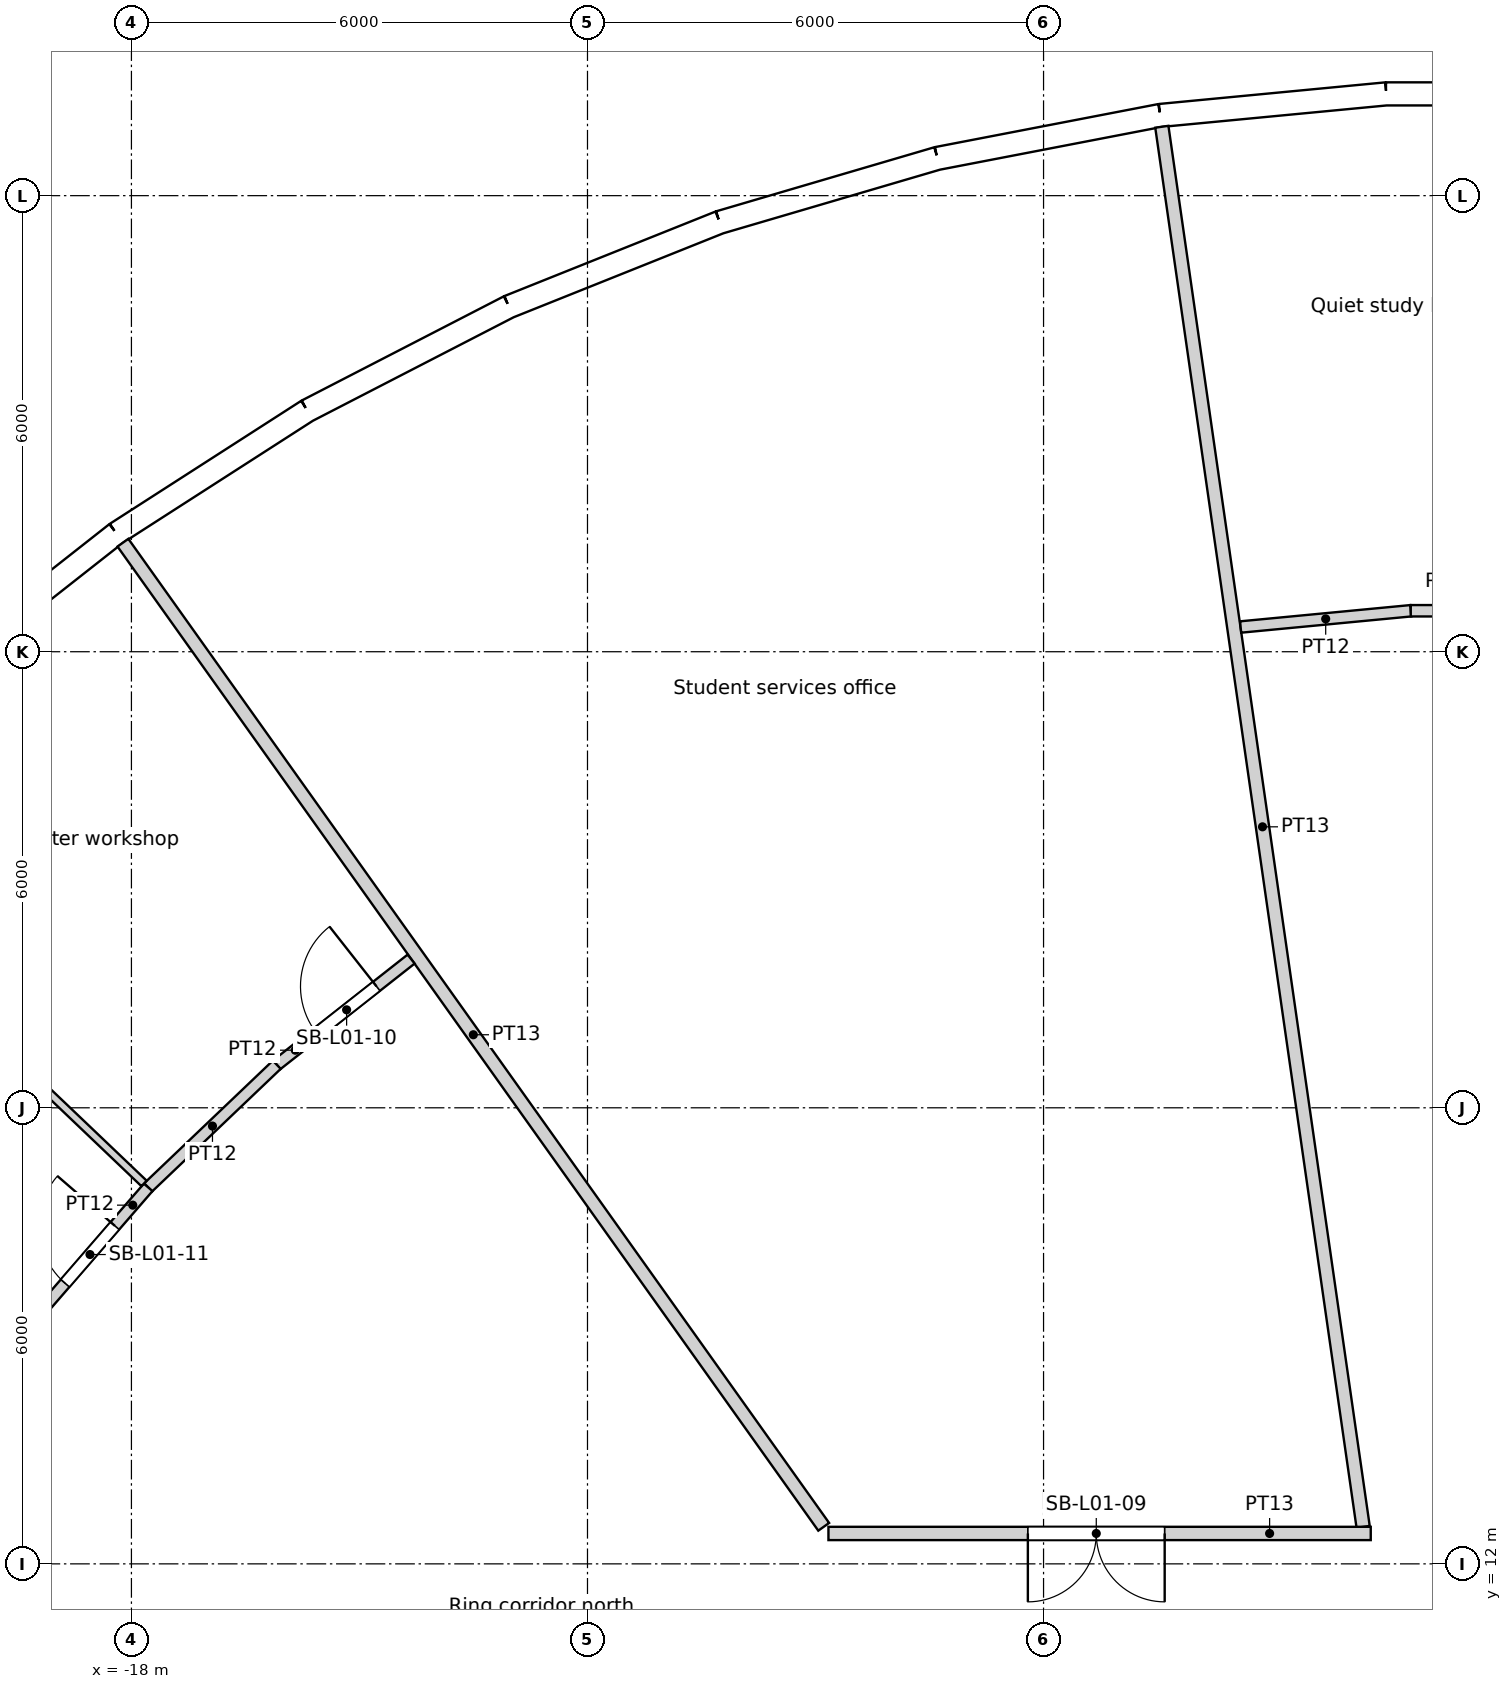
"""IFC4 building model, lengths in metres.
Left out: names, types, materials, properties, quantities, classifications, styles, units other than length and angle.
Written with IfcOpenShell. Run it as: python <this file> out.ifc"""

import sys

from ifc_helpers import new_model, si_unit, direction, frame, frame_2d, origin, origin_2d, place, context, subcontext, project, spatial, rectangle, circle, extrude, element, fill, save


model = new_model("IFC4")
c1 = context("Model", 3, precision=1e-05, world=origin(), true_north=direction((0.0, 1.0)))
c2 = subcontext(c1, "Body", "Model", "MODEL_VIEW")
j1 = project(units=[si_unit("LENGTHUNIT", "METRE"), si_unit("PLANEANGLEUNIT", "RADIAN")], contexts=[c1])
p1 = place(None, origin())
s1 = spatial("IfcSite", under=j1, at=p1, CompositionType="ELEMENT")
p2 = place(p1, origin())
s2 = spatial("IfcBuilding", under=s1, at=p2, CompositionType="ELEMENT")
p3 = place(p2, frame((0.0, 0.0, 9.0)))
s3 = spatial("IfcBuildingStorey", under=s2, at=p3, CompositionType="ELEMENT", Elevation=9.0)
for number, where, z_axis, x_axis in (
    (1, (-4.309, 29.966, 0.0), (0.0, 0.0, 1.0), (1.0, 0.0, 0.0)),
    (2, (-9.902, 28.61, 0.0), (0.0, 0.0, 1.0), (1.0, 0.0, 0.0)),
    (3, (-15.137, 26.219, 0.0), (0.0, 0.0, 1.0), (1.0, 0.0, 0.0)),
):
    element("IfcColumn", number, at=place(p3, frame(where, z_axis=z_axis, x_axis=x_axis)), inside=s3, PredefinedType="COLUMN", context=c2, shape_type="SweptSolid", body=[
        extrude(circle(Radius=0.7, at=origin_2d()), origin(), (0.0, 0.0, 1.0), 4.8),
    ])
for number, where, z_axis, x_axis in (
    (4, (-1.427, 24.506, 0.0), (0.0, 0.0, 1.0), (1.0, 0.0, 0.0)),
    (5, (-7.04, 23.516, 0.0), (0.0, 0.0, 1.0), (1.0, 0.0, 0.0)),
    (6, (-12.274, 21.259, 0.0), (0.0, 0.0, 1.0), (1.0, 0.0, 0.0)),
    (7, (-16.846, 17.855, 0.0), (0.0, 0.0, 1.0), (1.0, 0.0, 0.0)),
):
    element("IfcColumn", number, at=place(p3, frame(where, z_axis=z_axis, x_axis=x_axis)), inside=s3, PredefinedType="COLUMN", context=c2, shape_type="SweptSolid", body=[
        extrude(circle(Radius=0.75, at=origin_2d()), origin(), (0.0, 0.0, 1.0), 4.8),
    ])
for number, where, z_axis, x_axis in (
    (8, (-4.188, 18.35, 0.0), (0.0, 0.0, 1.0), (1.0, 0.0, 0.0)),
    (9, (-9.411, 16.301, 0.0), (0.0, 0.0, 1.0), (1.0, 0.0, 0.0)),
    (10, (-13.798, 12.802, 0.0), (0.0, 0.0, 1.0), (1.0, 0.0, 0.0)),
):
    element("IfcColumn", number, at=place(p3, frame(where, z_axis=z_axis, x_axis=x_axis)), inside=s3, PredefinedType="COLUMN", context=c2, shape_type="SweptSolid", body=[
        extrude(circle(Radius=0.8, at=origin_2d()), origin(), (0.0, 0.0, 1.0), 4.8),
    ])
p4 = place(p3, frame((1.493, 31.339, 0.0), z_axis=(0.0, 0.0, 1.0), x_axis=(-1.0, 0.0, 0.0)))
e11 = element("IfcWall", 11, at=p4, inside=s3, PredefinedType="SOLIDWALL", context=c2, shape_type="SweptSolid", body=[
    extrude(rectangle(XDim=2.986, YDim=0.3, at=frame_2d((1.493, 0.0))), origin(), (0.0, 0.0, 1.0), 4.35),
])
p5 = place(p4, frame((1.493, 0.0, 2.0)))
e12 = element("IfcOpeningElement", 12, at=p5, cuts=e11, PredefinedType="OPENING", context=c2, shape_type="SweptSolid", body=[
    extrude(circle(Radius=1.2, at=origin_2d()), frame((0.0, 0.16, 0.0), z_axis=(0.0, -1.0, 0.0), x_axis=(1.0, 0.0, 0.0)), (0.0, 0.0, 1.0), 0.32),
])
p6 = place(p3, frame((-1.493, 31.339, 0.0), z_axis=(0.0, 0.0, 1.0), x_axis=(-0.99547560533, -0.095017467833, 0.0)))
e13 = element("IfcWall", 13, at=p6, inside=s3, PredefinedType="SOLIDWALL", context=c2, shape_type="SweptSolid", body=[
    extrude(rectangle(XDim=2.986, YDim=0.3, at=frame_2d((1.493, 0.0))), origin(), (0.0, 0.0, 1.0), 4.35),
])
p7 = place(p6, frame((1.493, 0.0, 2.0)))
e14 = element("IfcOpeningElement", 14, at=p7, cuts=e13, PredefinedType="OPENING", context=c2, shape_type="SweptSolid", body=[
    extrude(circle(Radius=1.2, at=origin_2d()), frame((0.0, 0.16, 0.0), z_axis=(0.0, -1.0, 0.0), x_axis=(1.0, 0.0, 0.0)), (0.0, 0.0, 1.0), 0.32),
])
p8 = place(p3, frame((-4.465, 31.055, 0.0), z_axis=(0.0, 0.0, 1.0), x_axis=(-0.981918853666, -0.189302310646, 0.0)))
e15 = element("IfcWall", 15, at=p8, inside=s3, PredefinedType="SOLIDWALL", context=c2, shape_type="SweptSolid", body=[
    extrude(rectangle(XDim=2.986, YDim=0.3, at=frame_2d((1.493, 0.0))), origin(), (0.0, 0.0, 1.0), 4.35),
])
p9 = place(p8, frame((1.493, 0.0, 2.0)))
e16 = element("IfcOpeningElement", 16, at=p9, cuts=e15, PredefinedType="OPENING", context=c2, shape_type="SweptSolid", body=[
    extrude(circle(Radius=1.2, at=origin_2d()), frame((0.0, 0.16, 0.0), z_axis=(0.0, -1.0, 0.0), x_axis=(1.0, 0.0, 0.0)), (0.0, 0.0, 1.0), 0.32),
])
p10 = place(p3, frame((-7.397, 30.49, 0.0), z_axis=(0.0, 0.0, 1.0), x_axis=(-0.959502108153, -0.281701445593, 0.0)))
e17 = element("IfcWall", 17, at=p10, inside=s3, PredefinedType="SOLIDWALL", context=c2, shape_type="SweptSolid", body=[
    extrude(rectangle(XDim=2.986, YDim=0.3, at=frame_2d((1.493, 0.0))), origin(), (0.0, 0.0, 1.0), 4.35),
])
p11 = place(p10, frame((1.493, 0.0, 2.0)))
e18 = element("IfcOpeningElement", 18, at=p11, cuts=e17, PredefinedType="OPENING", context=c2, shape_type="SweptSolid", body=[
    extrude(circle(Radius=1.2, at=origin_2d()), frame((0.0, 0.16, 0.0), z_axis=(0.0, -1.0, 0.0), x_axis=(1.0, 0.0, 0.0)), (0.0, 0.0, 1.0), 0.32),
])
p12 = place(p3, frame((-10.261, 29.649, 0.0), z_axis=(0.0, 0.0, 1.0), x_axis=(-0.928380795373, -0.371630325434, 0.0)))
e19 = element("IfcWall", 19, at=p12, inside=s3, PredefinedType="SOLIDWALL", context=c2, shape_type="SweptSolid", body=[
    extrude(rectangle(XDim=2.986, YDim=0.3, at=frame_2d((1.493, 0.0))), origin(), (0.0, 0.0, 1.0), 4.35),
])
p13 = place(p12, frame((1.493, 0.0, 2.0)))
e20 = element("IfcOpeningElement", 20, at=p13, cuts=e19, PredefinedType="OPENING", context=c2, shape_type="SweptSolid", body=[
    extrude(circle(Radius=1.2, at=origin_2d()), frame((0.0, 0.16, 0.0), z_axis=(0.0, -1.0, 0.0), x_axis=(1.0, 0.0, 0.0)), (0.0, 0.0, 1.0), 0.32),
])
p14 = place(p3, frame((-13.033, 28.539, 0.0), z_axis=(0.0, 0.0, 1.0), x_axis=(-0.888831268481, -0.458234630043, 0.0)))
e21 = element("IfcWall", 21, at=p14, inside=s3, PredefinedType="SOLIDWALL", context=c2, shape_type="SweptSolid", body=[
    extrude(rectangle(XDim=2.986, YDim=0.3, at=frame_2d((1.493, 0.0))), origin(), (0.0, 0.0, 1.0), 4.35),
])
p15 = place(p14, frame((1.493, 0.0, 2.0)))
e22 = element("IfcOpeningElement", 22, at=p15, cuts=e21, PredefinedType="OPENING", context=c2, shape_type="SweptSolid", body=[
    extrude(circle(Radius=1.2, at=origin_2d()), frame((0.0, 0.16, 0.0), z_axis=(0.0, -1.0, 0.0), x_axis=(1.0, 0.0, 0.0)), (0.0, 0.0, 1.0), 0.32),
])
p16 = place(p3, frame((-15.687, 27.171, 0.0), z_axis=(0.0, 0.0, 1.0), x_axis=(-0.841242231846, -0.540658401727, 0.0)))
e23 = element("IfcWall", 23, at=p16, inside=s3, PredefinedType="SOLIDWALL", context=c2, shape_type="SweptSolid", body=[
    extrude(rectangle(XDim=2.986, YDim=0.3, at=frame_2d((1.493, 0.0))), origin(), (0.0, 0.0, 1.0), 4.35),
])
p17 = place(p16, frame((1.493, 0.0, 2.0)))
e24 = element("IfcOpeningElement", 24, at=p17, cuts=e23, PredefinedType="OPENING", context=c2, shape_type="SweptSolid", body=[
    extrude(circle(Radius=1.2, at=origin_2d()), frame((0.0, 0.16, 0.0), z_axis=(0.0, -1.0, 0.0), x_axis=(1.0, 0.0, 0.0)), (0.0, 0.0, 1.0), 0.32),
])
p18 = place(p3, frame((-18.199, 25.557, 0.0), z_axis=(0.0, 0.0, 1.0), x_axis=(-0.786043032847, -0.618171780747, 0.0)))
e25 = element("IfcWall", 25, at=p18, inside=s3, PredefinedType="SOLIDWALL", context=c2, shape_type="SweptSolid", body=[
    extrude(rectangle(XDim=2.986, YDim=0.3, at=frame_2d((1.493, 0.0))), origin(), (0.0, 0.0, 1.0), 4.35),
])
p19 = place(p18, frame((1.493, 0.0, 2.0)))
e26 = element("IfcOpeningElement", 26, at=p19, cuts=e25, PredefinedType="OPENING", context=c2, shape_type="SweptSolid", body=[
    extrude(circle(Radius=1.2, at=origin_2d()), frame((0.0, 0.16, 0.0), z_axis=(0.0, -1.0, 0.0), x_axis=(1.0, 0.0, 0.0)), (0.0, 0.0, 1.0), 0.32),
])
p20 = place(p3, frame((-22.598, 21.547, 0.0), z_axis=(0.0, 0.0, 1.0), x_axis=(0.723762960711, -0.690048677054, 0.0)))
e27 = element("IfcWall", 27, at=p20, inside=s3, PredefinedType="PARTITIONING", context=c2, shape_type="SweptSolid", body=[
    extrude(rectangle(XDim=6.583, YDim=0.1, at=frame_2d((3.291, 0.0))), origin(), (0.0, 0.0, 1.0), 3.75),
])
p21 = place(p3, frame((-18.112, 25.435, 0.0), z_axis=(0.0, 0.0, 1.0), x_axis=(0.580054828861, -0.814577433713, 0.0)))
e28 = element("IfcWall", 28, at=p21, inside=s3, PredefinedType="PARTITIONING", context=c2, shape_type="SweptSolid", body=[
    extrude(rectangle(XDim=15.894, YDim=0.175, at=frame_2d((7.947, 0.0))), origin(), (0.0, 0.0, 1.0), 3.75),
])
p22 = place(p3, frame((-19.311, 15.186, 0.0), z_axis=(0.0, 0.0, 1.0), x_axis=(0.654866925236, 0.755744209526, 0.0)))
e29 = element("IfcWall", 29, at=p22, inside=s3, PredefinedType="PARTITIONING", context=c2, shape_type="SweptSolid", body=[
    extrude(rectangle(XDim=2.338, YDim=0.15, at=frame_2d((1.169, 0.0))), origin(), (0.0, 0.0, 1.0), 3.75),
])
p23 = place(p22, frame((0.669, 0.0, 0.0)))
e30 = element("IfcOpeningElement", 30, at=p23, cuts=e29, PredefinedType="OPENING", context=c2, shape_type="SweptSolid", body=[
    extrude(rectangle(XDim=1.0, YDim=2.1, at=frame_2d((0.5, 1.05))), frame((0.0, 0.075, 0.0), z_axis=(0.0, -1.0, 0.0), x_axis=(1.0, 0.0, 0.0)), (0.0, 0.0, 1.0), 0.15),
])
p24 = place(p3, frame((-16.088, 18.566, 0.0), z_axis=(0.0, 0.0, 1.0), x_axis=(-0.723668407542, -0.690147836283, 0.0)))
e31 = element("IfcWall", 31, at=p24, inside=s3, PredefinedType="PARTITIONING", context=c2, shape_type="SweptSolid", body=[
    extrude(rectangle(XDim=2.338, YDim=0.15, at=frame_2d((1.169, 0.0))), origin(), (0.0, 0.0, 1.0), 3.75),
])
p25 = place(p3, frame((-16.088, 18.566, 0.0), z_axis=(0.0, 0.0, 1.0), x_axis=(0.786084691739, 0.618118805258, 0.0)))
e32 = element("IfcWall", 32, at=p25, inside=s3, PredefinedType="PARTITIONING", context=c2, shape_type="SweptSolid", body=[
    extrude(rectangle(XDim=2.249, YDim=0.15, at=frame_2d((1.124, 0.0))), origin(), (0.0, 0.0, 1.0), 3.75),
])
p26 = place(p25, frame((0.669, 0.0, 0.0)))
e33 = element("IfcOpeningElement", 33, at=p26, cuts=e32, PredefinedType="OPENING", context=c2, shape_type="SweptSolid", body=[
    extrude(rectangle(XDim=1.0, YDim=2.1, at=frame_2d((0.5, 1.05))), frame((0.0, 0.075, 0.0), z_axis=(0.0, -1.0, 0.0), x_axis=(1.0, 0.0, 0.0)), (0.0, 0.0, 1.0), 0.15),
])
p27 = place(p3, frame((-4.444, 30.906, 0.0), z_axis=(0.0, 0.0, 1.0), x_axis=(0.142304751751, -0.989822892051, 0.0)))
e34 = element("IfcWall", 34, at=p27, inside=s3, PredefinedType="PARTITIONING", context=c2, shape_type="SweptSolid", body=[
    extrude(rectangle(XDim=18.609, YDim=0.175, at=frame_2d((9.305, 0.0))), origin(), (0.0, 0.0, 1.0), 3.75),
])
p28 = place(p3, frame((-8.83, 12.4, 0.0), z_axis=(0.0, 0.0, 1.0), x_axis=(1.0, 0.0, 0.0)))
e35 = element("IfcWall", 35, at=p28, inside=s3, PredefinedType="PARTITIONING", context=c2, shape_type="SweptSolid", body=[
    extrude(rectangle(XDim=7.135, YDim=0.175, at=frame_2d((3.567, 0.0))), origin(), (0.0, 0.0, 1.0), 3.75),
])
p29 = place(p28, frame((2.624, 0.0, 0.0)))
e36 = element("IfcOpeningElement", 36, at=p29, cuts=e35, PredefinedType="OPENING", context=c2, shape_type="SweptSolid", body=[
    extrude(rectangle(XDim=1.8, YDim=2.4, at=frame_2d((0.9, 1.2))), frame((0.0, 0.087, 0.0), z_axis=(0.0, -1.0, 0.0), x_axis=(1.0, 0.0, 0.0)), (0.0, 0.0, 1.0), 0.175),
])
p30 = place(p3, frame((-1.169, 24.539, 0.0), z_axis=(0.0, 0.0, 1.0), x_axis=(-0.995476420249, -0.095008929725, 0.0)))
e37 = element("IfcWall", 37, at=p30, inside=s3, PredefinedType="PARTITIONING", context=c2, shape_type="SweptSolid", body=[
    extrude(rectangle(XDim=2.249, YDim=0.15, at=frame_2d((1.124, 0.0))), origin(), (0.0, 0.0, 1.0), 3.75),
])
p31 = place(p3, frame((-1.169, 24.539, 0.0), z_axis=(0.0, 0.0, 1.0), x_axis=(1.0, 0.0, 0.0)))
e38 = element("IfcWall", 38, at=p31, inside=s3, PredefinedType="PARTITIONING", context=c2, shape_type="SweptSolid", body=[
    extrude(rectangle(XDim=2.338, YDim=0.15, at=frame_2d((1.169, 0.0))), origin(), (0.0, 0.0, 1.0), 3.75),
])
p32 = place(p31, frame((1.069, 0.0, 0.0)))
e39 = element("IfcOpeningElement", 39, at=p32, cuts=e38, PredefinedType="OPENING", context=c2, shape_type="SweptSolid", body=[
    extrude(rectangle(XDim=1.0, YDim=2.1, at=frame_2d((0.5, 1.05))), frame((0.0, 0.075, 0.0), z_axis=(0.0, -1.0, 0.0), x_axis=(1.0, 0.0, 0.0)), (0.0, 0.0, 1.0), 0.15),
])
p33 = place(p5, origin())
e40 = element("IfcWindow", 40, at=p33, inside=s3, PartitioningType="SINGLE_PANEL", PredefinedType="WINDOW", context=c2, shape_type="SweptSolid", body=[
    extrude(circle(Radius=1.2, at=origin_2d()), frame((0.0, 0.12, 0.0), z_axis=(0.0, -1.0, 0.0), x_axis=(1.0, 0.0, 0.0)), (0.0, 0.0, 1.0), 0.1),
])
fill(e12, e40)
p34 = place(p7, origin())
e41 = element("IfcWindow", 41, at=p34, inside=s3, PartitioningType="SINGLE_PANEL", PredefinedType="WINDOW", context=c2, shape_type="SweptSolid", body=[
    extrude(circle(Radius=1.2, at=origin_2d()), frame((0.0, 0.12, 0.0), z_axis=(0.0, -1.0, 0.0), x_axis=(1.0, 0.0, 0.0)), (0.0, 0.0, 1.0), 0.1),
])
fill(e14, e41)
p35 = place(p9, origin())
e42 = element("IfcWindow", 42, at=p35, inside=s3, PartitioningType="SINGLE_PANEL", PredefinedType="WINDOW", context=c2, shape_type="SweptSolid", body=[
    extrude(circle(Radius=1.2, at=origin_2d()), frame((0.0, 0.12, 0.0), z_axis=(0.0, -1.0, 0.0), x_axis=(1.0, 0.0, 0.0)), (0.0, 0.0, 1.0), 0.1),
])
fill(e16, e42)
p36 = place(p11, origin())
e43 = element("IfcWindow", 43, at=p36, inside=s3, PartitioningType="SINGLE_PANEL", PredefinedType="WINDOW", context=c2, shape_type="SweptSolid", body=[
    extrude(circle(Radius=1.2, at=origin_2d()), frame((0.0, 0.12, 0.0), z_axis=(0.0, -1.0, 0.0), x_axis=(1.0, 0.0, 0.0)), (0.0, 0.0, 1.0), 0.1),
])
fill(e18, e43)
p37 = place(p13, origin())
e44 = element("IfcWindow", 44, at=p37, inside=s3, PartitioningType="SINGLE_PANEL", PredefinedType="WINDOW", context=c2, shape_type="SweptSolid", body=[
    extrude(circle(Radius=1.2, at=origin_2d()), frame((0.0, 0.12, 0.0), z_axis=(0.0, -1.0, 0.0), x_axis=(1.0, 0.0, 0.0)), (0.0, 0.0, 1.0), 0.1),
])
fill(e20, e44)
p38 = place(p15, origin())
e45 = element("IfcWindow", 45, at=p38, inside=s3, PartitioningType="SINGLE_PANEL", PredefinedType="WINDOW", context=c2, shape_type="SweptSolid", body=[
    extrude(circle(Radius=1.2, at=origin_2d()), frame((0.0, 0.12, 0.0), z_axis=(0.0, -1.0, 0.0), x_axis=(1.0, 0.0, 0.0)), (0.0, 0.0, 1.0), 0.1),
])
fill(e22, e45)
p39 = place(p17, origin())
e46 = element("IfcWindow", 46, at=p39, inside=s3, PartitioningType="SINGLE_PANEL", PredefinedType="WINDOW", context=c2, shape_type="SweptSolid", body=[
    extrude(circle(Radius=1.2, at=origin_2d()), frame((0.0, 0.12, 0.0), z_axis=(0.0, -1.0, 0.0), x_axis=(1.0, 0.0, 0.0)), (0.0, 0.0, 1.0), 0.1),
])
fill(e24, e46)
p40 = place(p19, origin())
e47 = element("IfcWindow", 47, at=p40, inside=s3, PartitioningType="SINGLE_PANEL", PredefinedType="WINDOW", context=c2, shape_type="SweptSolid", body=[
    extrude(circle(Radius=1.2, at=origin_2d()), frame((0.0, 0.12, 0.0), z_axis=(0.0, -1.0, 0.0), x_axis=(1.0, 0.0, 0.0)), (0.0, 0.0, 1.0), 0.1),
])
fill(e26, e47)
p41 = place(p29, origin())
e48 = element("IfcDoor", 48, at=p41, inside=s3, OperationType="DOUBLE_DOOR_SINGLE_SWING", PredefinedType="DOOR", context=c2, shape_type="SweptSolid", body=[
    extrude(rectangle(XDim=1.8, YDim=2.4, at=frame_2d((0.9, 1.2))), frame((0.0, 0.025, 0.0), z_axis=(0.0, -1.0, 0.0), x_axis=(1.0, 0.0, 0.0)), (0.0, 0.0, 1.0), 0.05),
])
fill(e36, e48)
p42 = place(p26, origin())
e49 = element("IfcDoor", 49, at=p42, inside=s3, OperationType="SINGLE_SWING_RIGHT", PredefinedType="DOOR", context=c2, shape_type="SweptSolid", body=[
    extrude(rectangle(XDim=1.0, YDim=2.1, at=frame_2d((0.5, 1.05))), frame((0.0, 0.025, 0.0), z_axis=(0.0, -1.0, 0.0), x_axis=(1.0, 0.0, 0.0)), (0.0, 0.0, 1.0), 0.05),
])
fill(e33, e49)
p43 = place(p23, origin())
e50 = element("IfcDoor", 50, at=p43, inside=s3, OperationType="SINGLE_SWING_RIGHT", PredefinedType="DOOR", context=c2, shape_type="SweptSolid", body=[
    extrude(rectangle(XDim=1.0, YDim=2.1, at=frame_2d((0.5, 1.05))), frame((0.0, 0.025, 0.0), z_axis=(0.0, -1.0, 0.0), x_axis=(1.0, 0.0, 0.0)), (0.0, 0.0, 1.0), 0.05),
])
fill(e30, e50)
save(model, sys.argv[1])
